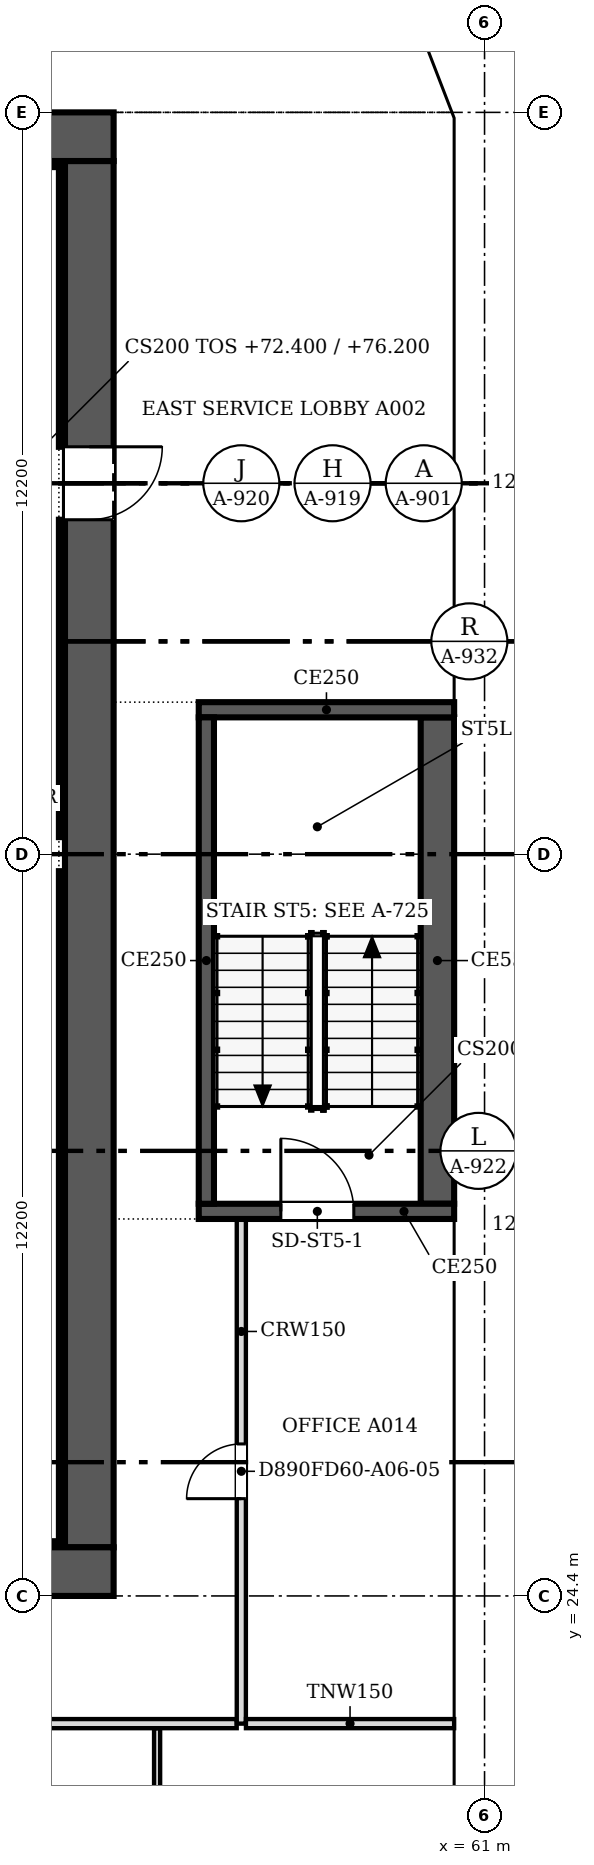
"""IFC4 building model, lengths in metres.
Left out: names, types, materials, properties, quantities, classifications, styles, units other than length and angle.
Written with IfcOpenShell. Run it as: python <this file> out.ifc"""

import sys

from ifc_helpers import new_model, si_unit, direction, frame, frame_2d, origin, place, context, subcontext, project, spatial, polyline, rectangle, outline, extrude, faceted_brep, source, transform, mapped, element, fill, save


model = new_model("IFC4")
c1 = context("Model", 3, precision=1e-05, world=origin(), true_north=direction((0.0, 1.0)))
c2 = subcontext(c1, "Body", "Model", "MODEL_VIEW")
j1 = project(units=[si_unit("LENGTHUNIT", "METRE"), si_unit("PLANEANGLEUNIT", "RADIAN")], contexts=[c1])
p1 = place(None, origin())
s1 = spatial("IfcSite", under=j1, at=p1, CompositionType="ELEMENT")
p2 = place(p1, origin())
s2 = spatial("IfcBuilding", under=s1, at=p2, CompositionType="ELEMENT")
p3 = place(p2, frame((0.0, 0.0, 72.4)))
s3 = spatial("IfcBuildingStorey", under=s2, at=p3, CompositionType="ELEMENT", Elevation=72.4)
m1 = source(origin(), c2, "Body", "SweptSolid", [
    extrude(outline(polyline([(3.05, 0.0), (6.1, 3.8), (3.05, 7.6), (0.0, 3.8), (3.05, 0.0)])), frame((0.0, 0.25, 0.0), z_axis=(0.0, -1.0, 0.0), x_axis=(1.0, 0.0, 0.0)), (0.0, 0.0, 1.0), 0.5),
])
p4 = place(p3, frame((60.75, 15.25, -3.8), z_axis=(0.0, 0.0, 1.0), x_axis=(0.0, 1.0, 0.0)))
e1 = element("IfcWall", 1, at=p4, inside=s3, PredefinedType="SOLIDWALL", context=c2, shape_type="MappedRepresentation", body=[
    mapped(m1, transform((0.0, 0.0, 0.0), scale=1.0)),
])
m2 = source(origin(), c2, "Body", "SweptSolid", [
    extrude(outline(polyline([(3.05, 0.399), (5.78, 3.8), (3.05, 7.2), (0.321, 3.8), (3.05, 0.399)])), frame((0.0, 0.26, 0.0), z_axis=(0.0, -1.0, 0.0), x_axis=(1.0, 0.0, 0.0)), (0.0, 0.0, 1.0), 0.52),
])
p5 = place(p4, origin())
e2 = element("IfcOpeningElement", 2, at=p5, cuts=e1, PredefinedType="OPENING", context=c2, shape_type="MappedRepresentation", body=[
    mapped(m2, transform((0.0, 0.0, 0.0), scale=1.0)),
])
m3 = source(origin(), c2, "Body", "Brep", [
    faceted_brep([(3.05, -0.25, 0.0), (6.1, -0.25, 3.8), (6.1, -0.25, 3.8), (3.05, -0.25, 7.6), (0.0, -0.25, 3.8), (0.0, 0.25, 3.8), (3.05, 0.25, 7.6), (6.1, 0.25, 3.8), (6.1, 0.25, 3.8), (3.05, 0.25, 0.0)], [[[0, 1, 2, 3, 4]], [[5, 6, 7, 8, 9]], [[9, 8, 1, 0]], [[7, 6, 3, 2]], [[6, 5, 4, 3]], [[5, 9, 0, 4]], [[1, 8, 7, 2]]]),
])
p6 = place(p3, frame((60.75, 21.35, -3.8), z_axis=(0.0, 0.0, 1.0), x_axis=(0.0, 1.0, 0.0)))
e3 = element("IfcWall", 3, at=p6, inside=s3, PredefinedType="SOLIDWALL", context=c2, shape_type="MappedRepresentation", body=[
    mapped(m3, transform((0.0, 0.0, 0.0), scale=1.0)),
])
p7 = place(p6, origin())
e4 = element("IfcOpeningElement", 4, at=p7, cuts=e3, PredefinedType="OPENING", context=c2, shape_type="MappedRepresentation", body=[
    mapped(m2, transform((0.0, 0.0, 0.0), scale=1.0)),
])
p8 = place(p3, frame((60.75, 27.45, -3.8), z_axis=(0.0, 0.0, 1.0), x_axis=(0.0, 1.0, 0.0)))
e5 = element("IfcWall", 5, at=p8, inside=s3, PredefinedType="SOLIDWALL", context=c2, shape_type="MappedRepresentation", body=[
    mapped(m1, transform((0.0, 0.0, 0.0), scale=1.0)),
])
p9 = place(p8, origin())
e6 = element("IfcOpeningElement", 6, at=p9, cuts=e5, PredefinedType="OPENING", context=c2, shape_type="MappedRepresentation", body=[
    mapped(m2, transform((0.0, 0.0, 0.0), scale=1.0)),
])
p10 = place(p3, frame((60.75, 33.55, -3.8), z_axis=(0.0, 0.0, 1.0), x_axis=(0.0, 1.0, 0.0)))
e7 = element("IfcWall", 7, at=p10, inside=s3, PredefinedType="SOLIDWALL", context=c2, shape_type="MappedRepresentation", body=[
    mapped(m3, transform((0.0, 0.0, 0.0), scale=1.0)),
])
p11 = place(p10, origin())
e8 = element("IfcOpeningElement", 8, at=p11, cuts=e7, PredefinedType="OPENING", context=c2, shape_type="MappedRepresentation", body=[
    mapped(m2, transform((0.0, 0.0, 0.0), scale=1.0)),
])
p12 = place(p3, frame((60.75, 39.65, -3.8), z_axis=(0.0, 0.0, 1.0), x_axis=(0.0, 1.0, 0.0)))
e9 = element("IfcWall", 9, at=p12, inside=s3, PredefinedType="SOLIDWALL", context=c2, shape_type="MappedRepresentation", body=[
    mapped(m1, transform((0.0, 0.0, 0.0), scale=1.0)),
])
p13 = place(p12, origin())
e10 = element("IfcOpeningElement", 10, at=p13, cuts=e9, PredefinedType="OPENING", context=c2, shape_type="MappedRepresentation", body=[
    mapped(m2, transform((0.0, 0.0, 0.0), scale=1.0)),
])
m4 = source(origin(), c2, "Body", "Brep", [
    faceted_brep([(3.003, -0.25, 0.0), (3.05, -0.25, 0.06), (3.05, -0.25, 7.54), (3.003, -0.25, 7.6), (0.0, -0.25, 3.8), (0.0, 0.25, 3.8), (2.957, 0.25, 7.541), (2.957, 0.25, 0.059), (3.003, 0.0, 0.0), (3.003, 0.0, 7.6)], [[[0, 1, 2, 3, 4]], [[5, 6, 7]], [[1, 0, 8]], [[9, 3, 2]], [[6, 5, 4, 3, 9]], [[5, 7, 8, 0, 4]], [[1, 8, 7, 6, 9, 2]]]),
])
p14 = place(p3, frame((60.75, 45.75, -3.8), z_axis=(0.0, 0.0, 1.0), x_axis=(0.0, 1.0, 0.0)))
e11 = element("IfcWall", 11, at=p14, inside=s3, PredefinedType="SOLIDWALL", context=c2, shape_type="MappedRepresentation", body=[
    mapped(m4, transform((0.0, 0.0, 0.0), scale=1.0)),
])
m5 = source(origin(), c2, "Body", "SweptSolid", [
    extrude(outline(polyline([(2.803, 6.944), (0.319, 3.8), (2.803, 0.656), (2.803, 6.944)])), frame((0.0, 0.26, 0.0), z_axis=(0.0, -1.0, 0.0), x_axis=(1.0, 0.0, 0.0)), (0.0, 0.0, 1.0), 0.52),
])
p15 = place(p14, origin())
e12 = element("IfcOpeningElement", 12, at=p15, cuts=e11, PredefinedType="OPENING", context=c2, shape_type="MappedRepresentation", body=[
    mapped(m5, transform((0.0, 0.0, 0.0), scale=1.0)),
])
m6 = source(origin(), c2, "Body", "Brep", [
    faceted_brep([(0.047, -0.25, 0.0), (2.997, -0.25, 3.8), (0.047, -0.25, 7.6), (0.0, -0.25, 7.541), (0.0, -0.25, 0.059), (0.093, 0.25, 7.54), (2.944, 0.25, 3.868), (2.944, 0.25, 3.732), (0.093, 0.25, 0.06), (2.997, 0.0, 3.8), (0.047, 0.0, 0.0), (0.047, 0.0, 7.6)], [[[0, 1, 2, 3, 4]], [[5, 6, 7, 8]], [[8, 7, 9, 1, 0, 10]], [[6, 5, 11, 2, 1, 9]], [[3, 2, 11]], [[10, 0, 4]], [[8, 10, 4, 3, 11, 5]], [[9, 7, 6]]]),
])
p16 = place(p3, frame((60.767, 48.71, -3.8), z_axis=(0.0, 0.0, 1.0), x_axis=(-0.359901446078, 0.932990326376, 0.0)))
e13 = element("IfcWall", 13, at=p16, inside=s3, PredefinedType="SOLIDWALL", context=c2, shape_type="MappedRepresentation", body=[
    mapped(m6, transform((0.0, 0.0, 0.0), scale=1.0)),
])
m7 = source(origin(), c2, "Body", "SweptSolid", [
    extrude(outline(polyline([(0.247, 0.665), (2.681, 3.8), (0.247, 6.935), (0.247, 0.665)])), frame((0.0, 0.26, 0.0), z_axis=(0.0, -1.0, 0.0), x_axis=(1.0, 0.0, 0.0)), (0.0, 0.0, 1.0), 0.52),
])
p17 = place(p16, origin())
e14 = element("IfcOpeningElement", 14, at=p17, cuts=e13, PredefinedType="OPENING", context=c2, shape_type="MappedRepresentation", body=[
    mapped(m7, transform((0.0, 0.0, 0.0), scale=1.0)),
])
p18 = place(p2, frame((0.0, 0.0, 76.2)))
s4 = spatial("IfcBuildingStorey", under=s2, at=p18, CompositionType="ELEMENT", Elevation=76.2)
m8 = source(origin(), c2, "Body", "Brep", [
    faceted_brep([(3.05, -0.25, 0.0), (6.1, -0.25, 3.8), (6.1, -0.25, 3.8), (3.05, -0.25, 7.6), (0.0, -0.25, 3.8), (0.0, 0.25, 3.8), (3.05, 0.25, 7.6), (6.1, 0.25, 3.8), (6.1, 0.25, 3.8), (3.05, 0.25, 0.0)], [[[0, 1, 2, 3, 4]], [[5, 6, 7, 8, 9]], [[9, 8, 1, 0]], [[7, 6, 3, 2]], [[6, 5, 4, 3]], [[5, 9, 0, 4]], [[1, 8, 7, 2]]]),
])
p19 = place(p18, frame((60.75, 18.3, -3.8), z_axis=(0.0, 0.0, 1.0), x_axis=(0.0, 1.0, 0.0)))
e15 = element("IfcWall", 15, at=p19, inside=s4, PredefinedType="SOLIDWALL", context=c2, shape_type="MappedRepresentation", body=[
    mapped(m8, transform((0.0, 0.0, 0.0), scale=1.0)),
])
m9 = source(origin(), c2, "Body", "SweptSolid", [
    extrude(outline(polyline([(3.05, 0.399), (5.78, 3.8), (3.05, 7.201), (0.321, 3.8), (3.05, 0.399)])), frame((0.0, 0.26, 0.0), z_axis=(0.0, -1.0, 0.0), x_axis=(1.0, 0.0, 0.0)), (0.0, 0.0, 1.0), 0.52),
])
p20 = place(p19, origin())
e16 = element("IfcOpeningElement", 16, at=p20, cuts=e15, PredefinedType="OPENING", context=c2, shape_type="MappedRepresentation", body=[
    mapped(m9, transform((0.0, 0.0, 0.0), scale=1.0)),
])
m10 = source(origin(), c2, "Body", "SweptSolid", [
    extrude(outline(polyline([(3.05, 0.0), (6.1, 3.8), (3.05, 7.6), (0.0, 3.8), (3.05, 0.0)])), frame((0.0, 0.25, 0.0), z_axis=(0.0, -1.0, 0.0), x_axis=(1.0, 0.0, 0.0)), (0.0, 0.0, 1.0), 0.5),
])
p21 = place(p18, frame((60.75, 24.4, -3.8), z_axis=(0.0, 0.0, 1.0), x_axis=(0.0, 1.0, 0.0)))
e17 = element("IfcWall", 17, at=p21, inside=s4, PredefinedType="SOLIDWALL", context=c2, shape_type="MappedRepresentation", body=[
    mapped(m10, transform((0.0, 0.0, 0.0), scale=1.0)),
])
p22 = place(p21, origin())
e18 = element("IfcOpeningElement", 18, at=p22, cuts=e17, PredefinedType="OPENING", context=c2, shape_type="MappedRepresentation", body=[
    mapped(m9, transform((0.0, 0.0, 0.0), scale=1.0)),
])
p23 = place(p18, frame((60.75, 30.5, -3.8), z_axis=(0.0, 0.0, 1.0), x_axis=(0.0, 1.0, 0.0)))
e19 = element("IfcWall", 19, at=p23, inside=s4, PredefinedType="SOLIDWALL", context=c2, shape_type="MappedRepresentation", body=[
    mapped(m10, transform((0.0, 0.0, 0.0), scale=1.0)),
])
p24 = place(p23, origin())
e20 = element("IfcOpeningElement", 20, at=p24, cuts=e19, PredefinedType="OPENING", context=c2, shape_type="MappedRepresentation", body=[
    mapped(m9, transform((0.0, 0.0, 0.0), scale=1.0)),
])
p25 = place(p18, frame((60.75, 36.6, -3.8), z_axis=(0.0, 0.0, 1.0), x_axis=(0.0, 1.0, 0.0)))
e21 = element("IfcWall", 21, at=p25, inside=s4, PredefinedType="SOLIDWALL", context=c2, shape_type="MappedRepresentation", body=[
    mapped(m8, transform((0.0, 0.0, 0.0), scale=1.0)),
])
p26 = place(p25, origin())
e22 = element("IfcOpeningElement", 22, at=p26, cuts=e21, PredefinedType="OPENING", context=c2, shape_type="MappedRepresentation", body=[
    mapped(m9, transform((0.0, 0.0, 0.0), scale=1.0)),
])
m11 = source(origin(), c2, "Body", "Brep", [
    faceted_brep([(3.05, -0.25, 0.0), (6.053, -0.25, 3.8), (3.05, -0.25, 7.6), (0.0, -0.25, 3.8), (0.0, 0.25, 3.8), (3.05, 0.25, 7.6), (6.007, 0.25, 3.859), (6.007, 0.25, 3.741), (3.05, 0.25, 0.0), (6.053, 0.0, 3.8)], [[[0, 1, 2, 3]], [[4, 5, 6, 7, 8]], [[8, 7, 9, 1, 0]], [[6, 5, 2, 1, 9]], [[5, 4, 3, 2]], [[4, 8, 0, 3]], [[9, 7, 6]]]),
])
p27 = place(p18, frame((60.75, 42.7, -3.8), z_axis=(0.0, 0.0, 1.0), x_axis=(0.0, 1.0, 0.0)))
e23 = element("IfcWall", 23, at=p27, inside=s4, PredefinedType="SOLIDWALL", context=c2, shape_type="MappedRepresentation", body=[
    mapped(m11, transform((0.0, 0.0, 0.0), scale=1.0)),
])
m12 = source(origin(), c2, "Body", "SweptSolid", [
    extrude(outline(polyline([(3.049, 0.401), (5.735, 3.8), (3.049, 7.199), (0.321, 3.8), (3.049, 0.401)])), frame((0.0, 0.26, 0.0), z_axis=(0.0, -1.0, 0.0), x_axis=(1.0, 0.0, 0.0)), (0.0, 0.0, 1.0), 0.52),
])
p28 = place(p27, origin())
e24 = element("IfcOpeningElement", 24, at=p28, cuts=e23, PredefinedType="OPENING", context=c2, shape_type="MappedRepresentation", body=[
    mapped(m12, transform((0.0, 0.0, 0.0), scale=1.0)),
])
m13 = source(origin(), c2, "Body", "Brep", [
    faceted_brep([(2.95, -0.25, 0.0), (3.003, -0.25, 0.068), (3.003, -0.25, 7.532), (2.95, -0.25, 7.6), (0.0, -0.25, 3.8), (0.047, 0.25, 3.86), (2.898, 0.25, 7.532), (2.898, 0.25, 0.068), (0.047, 0.25, 3.74), (2.95, 0.0, 0.0), (2.95, 0.0, 7.6), (0.0, 0.0, 3.8)], [[[0, 1, 2, 3, 4]], [[5, 6, 7, 8]], [[1, 0, 9]], [[10, 3, 2]], [[6, 5, 11, 4, 3, 10]], [[8, 7, 9, 0, 4, 11]], [[8, 11, 5]], [[1, 9, 7, 6, 10, 2]]]),
])
p29 = place(p18, frame((60.75, 48.753, -3.8), z_axis=(0.0, 0.0, 1.0), x_axis=(-0.35992665181, 0.932980602862, 0.0)))
e25 = element("IfcWall", 25, at=p29, inside=s4, PredefinedType="SOLIDWALL", context=c2, shape_type="MappedRepresentation", body=[
    mapped(m13, transform((0.0, 0.0, 0.0), scale=1.0)),
])
m14 = source(origin(), c2, "Body", "SweptSolid", [
    extrude(outline(polyline([(2.75, 6.935), (0.316, 3.8), (2.75, 0.665), (2.75, 6.935)])), frame((0.0, 0.26, 0.0), z_axis=(0.0, -1.0, 0.0), x_axis=(1.0, 0.0, 0.0)), (0.0, 0.0, 1.0), 0.52),
])
p30 = place(p29, origin())
e26 = element("IfcOpeningElement", 26, at=p30, cuts=e25, PredefinedType="OPENING", context=c2, shape_type="MappedRepresentation", body=[
    mapped(m14, transform((0.0, 0.0, 0.0), scale=1.0)),
])
p31 = place(p3, frame((54.9, 24.8, 0.0), z_axis=(0.0, 0.0, 1.0), x_axis=(-1.0, 0.0, 0.0)))
e27 = element("IfcWall", 27, at=p31, inside=s3, PredefinedType="SHEAR", context=c2, shape_type="SweptSolid", body=[
    extrude(rectangle(XDim=24.4, YDim=0.8, at=frame_2d((12.2, 0.0))), origin(), (0.0, 0.0, 1.0), 3.8),
])
m15 = source(origin(), c2, "Body", "SweptSolid", [
    extrude(rectangle(XDim=1.2, YDim=2.1, at=frame_2d((0.6, 1.05))), frame((0.0, 0.41, 0.0), z_axis=(0.0, -1.0, 0.0), x_axis=(1.0, 0.0, 0.0)), (0.0, 0.0, 1.0), 0.82),
])
p32 = place(p31, frame((1.5, 0.0, 0.0)))
e28 = element("IfcOpeningElement", 28, at=p32, cuts=e27, PredefinedType="OPENING", context=c2, shape_type="MappedRepresentation", body=[
    mapped(m15, transform((0.0, 0.0, 0.0), scale=1.0)),
])
p33 = place(p3, frame((30.5, 48.4, 0.0), z_axis=(0.0, 0.0, 1.0), x_axis=(1.0, 0.0, 0.0)))
e29 = element("IfcWall", 29, at=p33, inside=s3, PredefinedType="SHEAR", context=c2, shape_type="SweptSolid", body=[
    extrude(rectangle(XDim=24.4, YDim=0.8, at=frame_2d((12.2, 0.0))), origin(), (0.0, 0.0, 1.0), 3.8),
])
p34 = place(p3, frame((54.5, 48.0, 0.0), z_axis=(0.0, 0.0, 1.0), x_axis=(0.0, -1.0, 0.0)))
e30 = element("IfcWall", 30, at=p34, inside=s3, PredefinedType="SHEAR", context=c2, shape_type="SweptSolid", body=[
    extrude(rectangle(XDim=22.8, YDim=0.8, at=frame_2d((11.4, 0.0))), origin(), (0.0, 0.0, 1.0), 3.8),
])
p35 = place(p34, frame((4.7, 0.0, 0.0)))
e31 = element("IfcOpeningElement", 31, at=p35, cuts=e30, PredefinedType="OPENING", context=c2, shape_type="MappedRepresentation", body=[
    mapped(m15, transform((0.0, 0.0, 0.0), scale=1.0)),
])
p36 = place(p3, frame((53.4, 25.25, 0.0), z_axis=(0.0, 0.0, 1.0), x_axis=(1.0, 0.0, 0.0)))
e32 = element("IfcWall", 32, at=p36, inside=s3, PredefinedType="SOLIDWALL", context=c2, shape_type="SweptSolid", body=[
    extrude(rectangle(XDim=0.7, YDim=0.1, at=frame_2d((0.35, 0.0))), origin(), (0.0, 0.0, 1.0), 3.8),
])
p37 = place(p3, frame((31.3, 47.95, 0.0), z_axis=(0.0, 0.0, 1.0), x_axis=(1.0, 0.0, 0.0)))
e33 = element("IfcWall", 33, at=p37, inside=s3, PredefinedType="SOLIDWALL", context=c2, shape_type="SweptSolid", body=[
    extrude(rectangle(XDim=22.8, YDim=0.1, at=frame_2d((11.4, 0.0))), origin(), (0.0, 0.0, 1.0), 3.8),
])
p38 = place(p3, frame((54.05, 25.3, 0.0), z_axis=(0.0, 0.0, 1.0), x_axis=(0.0, 1.0, 0.0)))
e34 = element("IfcWall", 34, at=p38, inside=s3, PredefinedType="SOLIDWALL", context=c2, shape_type="SweptSolid", body=[
    extrude(rectangle(XDim=11.02, YDim=0.1, at=frame_2d((5.51, 0.0))), origin(), (0.0, 0.0, 1.0), 3.8),
])
p39 = place(p3, frame((54.05, 36.88, 0.0), z_axis=(0.0, 0.0, 1.0), x_axis=(0.0, 1.0, 0.0)))
e35 = element("IfcWall", 35, at=p39, inside=s3, PredefinedType="SOLIDWALL", context=c2, shape_type="SweptSolid", body=[
    extrude(rectangle(XDim=5.22, YDim=0.1, at=frame_2d((2.61, 0.0))), origin(), (0.0, 0.0, 1.0), 3.8),
])
p40 = place(p3, frame((54.05, 43.3, 0.0), z_axis=(0.0, 0.0, 1.0), x_axis=(0.0, 1.0, 0.0)))
e36 = element("IfcWall", 36, at=p40, inside=s3, PredefinedType="SOLIDWALL", context=c2, shape_type="SweptSolid", body=[
    extrude(rectangle(XDim=4.6, YDim=0.1, at=frame_2d((2.3, 0.0))), origin(), (0.0, 0.0, 1.0), 3.8),
])
p41 = place(p3, frame((60.5, 30.725, 0.0), z_axis=(0.0, 0.0, 1.0), x_axis=(-1.0, 0.0, 0.0)))
e37 = element("IfcWall", 37, at=p41, inside=s3, PredefinedType="SOLIDWALL", context=c2, shape_type="SweptSolid", body=[
    extrude(rectangle(XDim=4.2, YDim=0.25, at=frame_2d((2.1, 0.0))), origin(), (0.0, 0.0, 1.0), 3.8),
])
m16 = source(origin(), c2, "Body", "SweptSolid", [
    extrude(rectangle(XDim=1.2, YDim=2.1, at=frame_2d((0.6, 1.05))), frame((0.0, 0.135, 0.0), z_axis=(0.0, -1.0, 0.0), x_axis=(1.0, 0.0, 0.0)), (0.0, 0.0, 1.0), 0.27),
])
p42 = place(p41, frame((1.65, 0.0, 0.0)))
e38 = element("IfcOpeningElement", 38, at=p42, cuts=e37, PredefinedType="OPENING", context=c2, shape_type="MappedRepresentation", body=[
    mapped(m16, transform((0.0, 0.0, 0.0), scale=1.0)),
])
p43 = place(p3, frame((56.425, 30.85, 0.0), z_axis=(0.0, 0.0, 1.0), x_axis=(0.0, 1.0, 0.0)))
e39 = element("IfcWall", 39, at=p43, inside=s3, PredefinedType="SOLIDWALL", context=c2, shape_type="SweptSolid", body=[
    extrude(rectangle(XDim=8.0, YDim=0.25, at=frame_2d((4.0, 0.0))), origin(), (0.0, 0.0, 1.0), 3.8),
])
p44 = place(p3, frame((56.3, 38.975, 0.0), z_axis=(0.0, 0.0, 1.0), x_axis=(1.0, 0.0, 0.0)))
e40 = element("IfcWall", 40, at=p44, inside=s3, PredefinedType="SOLIDWALL", context=c2, shape_type="SweptSolid", body=[
    extrude(rectangle(XDim=4.2, YDim=0.25, at=frame_2d((2.1, 0.0))), origin(), (0.0, 0.0, 1.0), 3.8),
])
p45 = place(p3, frame((60.225, 38.85, 0.0), z_axis=(0.0, 0.0, 1.0), x_axis=(0.0, -1.0, 0.0)))
e41 = element("IfcWall", 41, at=p45, inside=s3, PredefinedType="SOLIDWALL", context=c2, shape_type="SweptSolid", body=[
    extrude(rectangle(XDim=8.0, YDim=0.55, at=frame_2d((4.0, 0.0))), origin(), (0.0, 0.0, 1.0), 3.8),
])
p46 = place(p3, frame((55.615, 22.224, 0.0), z_axis=(0.0, 0.0, 1.0), x_axis=(0.0, -1.0, 0.0)))
e42 = element("IfcWall", 42, at=p46, inside=s3, PredefinedType="PARTITIONING", context=c2, shape_type="SweptSolid", body=[
    extrude(rectangle(XDim=5.048, YDim=0.1, at=frame_2d((2.524, 0.0))), origin(), (0.0, 0.0, 1.0), 3.067),
])
m17 = source(origin(), c2, "Body", "SweptSolid", [
    extrude(rectangle(XDim=0.9, YDim=2.1, at=frame_2d((0.45, 1.05))), frame((0.0, 0.06, 0.0), z_axis=(0.0, -1.0, 0.0), x_axis=(1.0, 0.0, 0.0)), (0.0, 0.0, 1.0), 0.12),
])
p47 = place(p46, frame((2.048, 0.0, 0.0)))
e43 = element("IfcOpeningElement", 43, at=p47, cuts=e42, PredefinedType="OPENING", context=c2, shape_type="MappedRepresentation", body=[
    mapped(m17, transform((0.0, 0.0, 0.0), scale=1.0)),
])
p48 = place(p3, frame((47.4, 22.3, 0.0), z_axis=(0.0, 0.0, 1.0), x_axis=(1.0, 0.0, 0.0)))
e44 = element("IfcWall", 44, at=p48, inside=s3, PredefinedType="PARTITIONING", context=c2, shape_type="SweptSolid", body=[
    extrude(rectangle(XDim=9.524, YDim=0.15, at=frame_2d((4.762, 0.0))), origin(), (0.0, 0.0, 1.0), 3.067),
])
p49 = place(p3, frame((57.0, 30.6, 0.0), z_axis=(0.0, 0.0, 1.0), x_axis=(0.0, -1.0, 0.0)))
e45 = element("IfcWall", 45, at=p49, inside=s3, PredefinedType="PARTITIONING", context=c2, shape_type="SweptSolid", body=[
    extrude(rectangle(XDim=8.3, YDim=0.15, at=frame_2d((4.15, 0.0))), origin(), (0.0, 0.0, 1.0), 3.067),
])
m18 = source(origin(), c2, "Body", "SweptSolid", [
    extrude(rectangle(XDim=0.9, YDim=2.1, at=frame_2d((0.45, 1.05))), frame((0.0, 0.085, 0.0), z_axis=(0.0, -1.0, 0.0), x_axis=(1.0, 0.0, 0.0)), (0.0, 0.0, 1.0), 0.17),
])
p50 = place(p49, frame((3.7, 0.0, 0.0)))
e46 = element("IfcOpeningElement", 46, at=p50, cuts=e45, PredefinedType="OPENING", context=c2, shape_type="MappedRepresentation", body=[
    mapped(m18, transform((0.0, 0.0, 0.0), scale=1.0)),
])
p51 = place(p3, frame((57.076, 22.3, 0.0), z_axis=(0.0, 0.0, 1.0), x_axis=(1.0, 0.0, 0.0)))
e47 = element("IfcWall", 47, at=p51, inside=s3, PredefinedType="PARTITIONING", context=c2, shape_type="SweptSolid", body=[
    extrude(rectangle(XDim=3.424, YDim=0.15, at=frame_2d((1.712, 0.0))), origin(), (0.0, 0.0, 1.0), 3.067),
])
m19 = source(origin(), c2, "Body", "SweptSolid", [
    extrude(rectangle(XDim=1.2, YDim=2.1, at=frame_2d((0.6, 1.05))), frame((0.0, 0.025, 0.0), z_axis=(0.0, -1.0, 0.0), x_axis=(1.0, 0.0, 0.0)), (0.0, 0.0, 1.0), 0.05),
])
p52 = place(p35, origin())
e48 = element("IfcDoor", 48, at=p52, inside=s3, OperationType="SINGLE_SWING_LEFT", PredefinedType="DOOR", context=c2, shape_type="MappedRepresentation", body=[
    mapped(m19, transform((0.0, 0.0, 0.0), scale=1.0)),
])
fill(e31, e48)
p53 = place(p42, origin())
e49 = element("IfcDoor", 49, at=p53, inside=s3, OperationType="SINGLE_SWING_RIGHT", PredefinedType="DOOR", context=c2, shape_type="MappedRepresentation", body=[
    mapped(m19, transform((0.0, 0.0, 0.0), scale=1.0)),
])
fill(e38, e49)
m20 = source(origin(), c2, "Body", "SweptSolid", [
    extrude(rectangle(XDim=0.9, YDim=2.1, at=frame_2d((0.45, 1.05))), frame((0.0, 0.025, 0.0), z_axis=(0.0, -1.0, 0.0), x_axis=(1.0, 0.0, 0.0)), (0.0, 0.0, 1.0), 0.05),
])
p54 = place(p50, origin())
e50 = element("IfcDoor", 50, at=p54, inside=s3, OperationType="SINGLE_SWING_RIGHT", PredefinedType="DOOR", context=c2, shape_type="MappedRepresentation", body=[
    mapped(m20, transform((0.0, 0.0, 0.0), scale=1.0)),
])
fill(e46, e50)
save(model, sys.argv[1])
